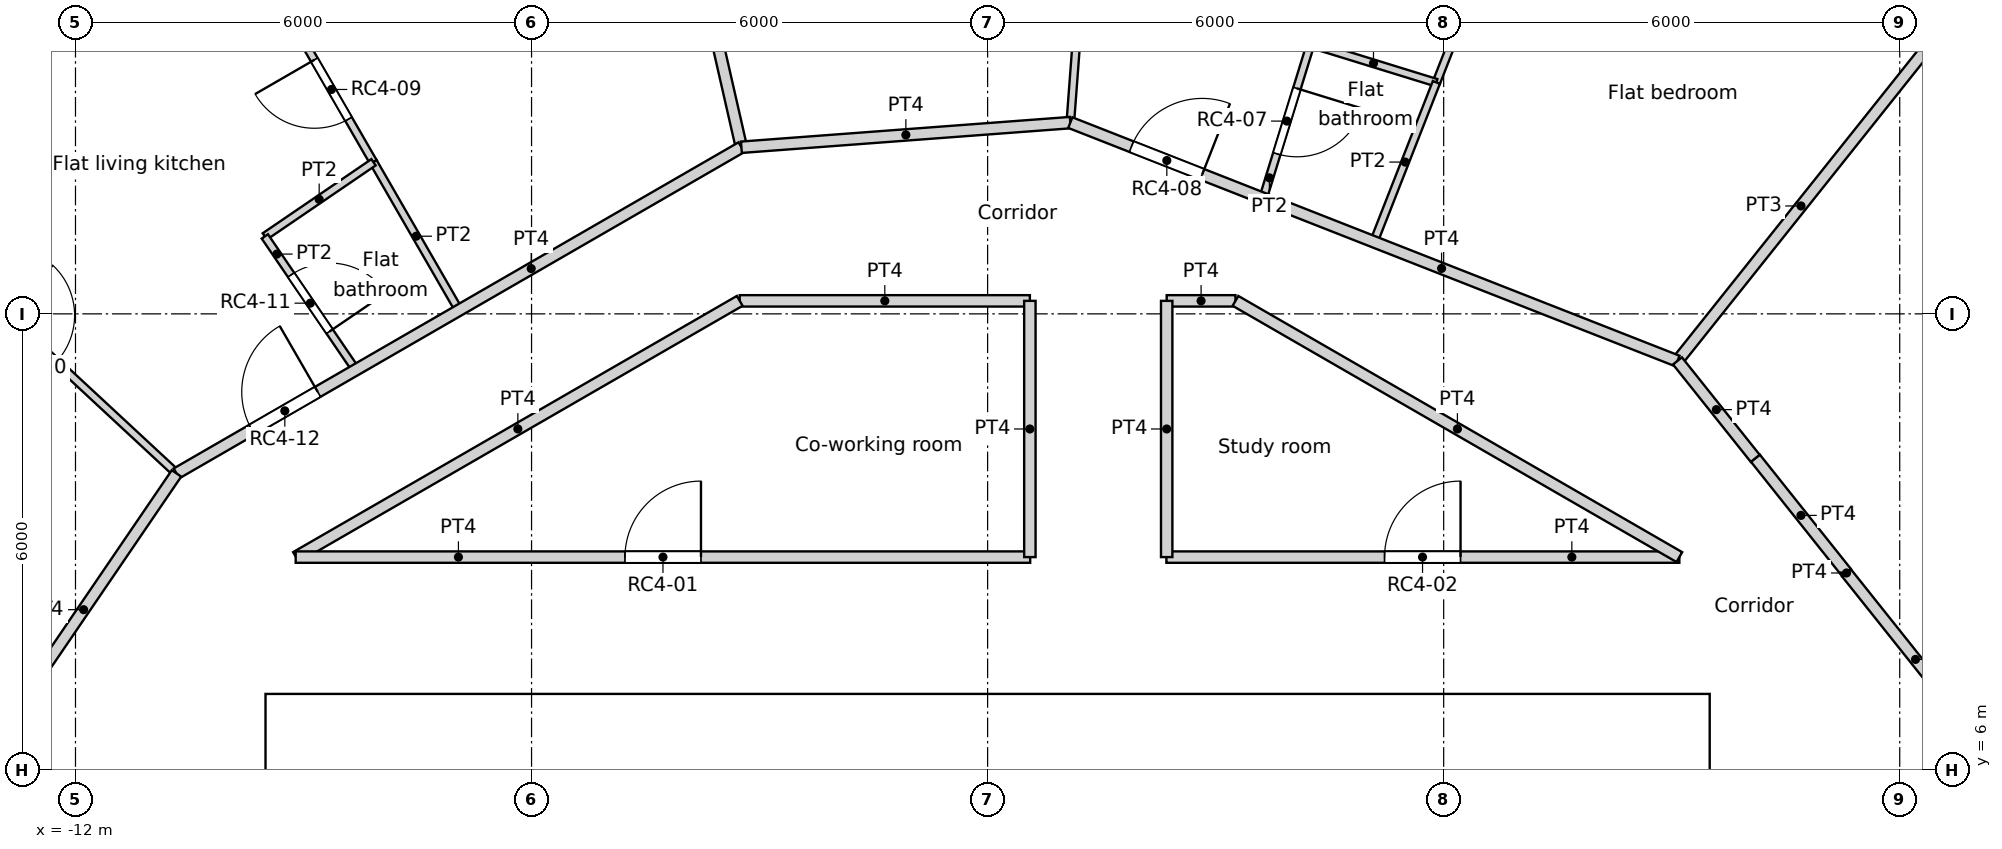
"""IFC4 building model, lengths in metres.
Left out: names, types, materials, properties, quantities, classifications, styles, units other than length and angle.
Written with IfcOpenShell. Run it as: python <this file> out.ifc"""

import sys

from ifc_helpers import new_model, si_unit, direction, frame, frame_2d, origin, origin_2d, place, context, subcontext, project, spatial, rectangle, circle, extrude, element, fill, save


model = new_model("IFC4")
c1 = context("Model", 3, precision=1e-05, world=origin(), true_north=direction((0.0, 1.0)))
c2 = subcontext(c1, "Body", "Model", "MODEL_VIEW")
j1 = project(units=[si_unit("LENGTHUNIT", "METRE"), si_unit("PLANEANGLEUNIT", "RADIAN")], contexts=[c1])
p1 = place(None, origin())
s1 = spatial("IfcSite", under=j1, at=p1, CompositionType="ELEMENT")
p2 = place(p1, origin())
s2 = spatial("IfcBuilding", under=s1, at=p2, CompositionType="ELEMENT")
p3 = place(p2, frame((0.0, 0.0, 263.4)))
s3 = spatial("IfcBuildingStorey", under=s2, at=p3, CompositionType="ELEMENT", Elevation=263.4)
p4 = place(p3, frame((11.735, 14.716, 0.0), z_axis=(0.0, 0.0, 1.0), x_axis=(1.0, 0.0, 0.0)))
e1 = element("IfcColumn", 1, at=p4, inside=s3, PredefinedType="COLUMN", context=c2, shape_type="SweptSolid", body=[
    extrude(circle(Radius=0.55, at=origin_2d()), origin(), (0.0, 0.0, 1.0), 3.6),
])
p5 = place(p3, frame((-9.5, 6.7, 0.0), z_axis=(0.0, 0.0, 1.0), x_axis=(1.0, 0.0, 0.0)))
e2 = element("IfcWall", 2, at=p5, inside=s3, PredefinedType="SOLIDWALL", context=c2, shape_type="SweptSolid", body=[
    extrude(rectangle(XDim=19.0, YDim=0.6, at=frame_2d((9.5, 0.0))), origin(), (0.0, 0.0, 1.0), 3.6),
])
p6 = place(p5, frame((5.35, 0.0, 0.0)))
e3 = element("IfcOpeningElement", 3, at=p6, cuts=e2, PredefinedType="OPENING", context=c2, shape_type="SweptSolid", body=[
    extrude(rectangle(XDim=1.7, YDim=2.1, at=frame_2d((0.85, 1.05))), frame((0.0, 0.3, 0.0), z_axis=(0.0, -1.0, 0.0), x_axis=(1.0, 0.0, 0.0)), (0.0, 0.0, 1.0), 0.6),
])
p7 = place(p3, frame((-9.2, -6.4, 0.0), z_axis=(0.0, 0.0, 1.0), x_axis=(0.0, 1.0, 0.0)))
e4 = element("IfcWall", 4, at=p7, inside=s3, PredefinedType="SOLIDWALL", context=c2, shape_type="SweptSolid", body=[
    extrude(rectangle(XDim=12.8, YDim=0.6, at=frame_2d((6.4, 0.0))), origin(), (0.0, 0.0, 1.0), 3.6),
])
p8 = place(p3, frame((9.2, -6.4, 0.0), z_axis=(0.0, 0.0, 1.0), x_axis=(0.0, 1.0, 0.0)))
e5 = element("IfcWall", 5, at=p8, inside=s3, PredefinedType="SOLIDWALL", context=c2, shape_type="SweptSolid", body=[
    extrude(rectangle(XDim=12.8, YDim=0.6, at=frame_2d((6.4, 0.0))), origin(), (0.0, 0.0, 1.0), 3.6),
])
p9 = place(p8, frame((6.4, 0.0, 0.0)))
e6 = element("IfcOpeningElement", 6, at=p9, cuts=e5, PredefinedType="OPENING", context=c2, shape_type="SweptSolid", body=[
    extrude(rectangle(XDim=1.8, YDim=2.1, at=frame_2d((0.9, 1.05))), frame((0.0, 0.3, 0.0), z_axis=(0.0, -1.0, 0.0), x_axis=(1.0, 0.0, 0.0)), (0.0, 0.0, 1.0), 0.6),
])
for number, where, z_axis, x_axis in (
    (7, (-2.25, 3.25, 0.0), (0.0, 0.0, 1.0), (0.0, 1.0, 0.0)),
    (8, (0.55, 3.25, 0.0), (0.0, 0.0, 1.0), (0.0, 1.0, 0.0)),
    (9, (3.35, 3.25, 0.0), (0.0, 0.0, 1.0), (0.0, 1.0, 0.0)),
    (10, (6.15, 3.25, 0.0), (0.0, 0.0, 1.0), (0.0, 1.0, 0.0)),
):
    element("IfcWall", number, at=place(p3, frame(where, z_axis=z_axis, x_axis=x_axis)), inside=s3, PredefinedType="SOLIDWALL", context=c2, shape_type="SweptSolid", body=[
        extrude(rectangle(XDim=3.15, YDim=0.3, at=frame_2d((1.575, 0.0))), origin(), (0.0, 0.0, 1.0), 3.25),
    ])
p10 = place(p3, frame((-9.103, 8.8, 0.0), z_axis=(0.0, 0.0, 1.0), x_axis=(1.0, 0.0, 0.0)))
e11 = element("IfcWall", 11, at=p10, inside=s3, PredefinedType="PARTITIONING", context=c2, shape_type="SweptSolid", body=[
    extrude(rectangle(XDim=9.663, YDim=0.15, at=frame_2d((4.832, 0.0))), origin(), (0.0, 0.0, 1.0), 3.25),
])
p11 = place(p10, frame((4.332, 0.0, 0.0)))
e12 = element("IfcOpeningElement", 12, at=p11, cuts=e11, PredefinedType="OPENING", context=c2, shape_type="SweptSolid", body=[
    extrude(rectangle(XDim=1.0, YDim=2.04, at=frame_2d((0.5, 1.02))), frame((0.0, 0.075, 0.0), z_axis=(0.0, -1.0, 0.0), x_axis=(1.0, 0.0, 0.0)), (0.0, 0.0, 1.0), 0.15),
])
p12 = place(p3, frame((2.352, 8.8, 0.0), z_axis=(0.0, 0.0, 1.0), x_axis=(1.0, 0.0, 0.0)))
e13 = element("IfcWall", 13, at=p12, inside=s3, PredefinedType="PARTITIONING", context=c2, shape_type="SweptSolid", body=[
    extrude(rectangle(XDim=6.749, YDim=0.15, at=frame_2d((3.374, 0.0))), origin(), (0.0, 0.0, 1.0), 3.25),
])
p13 = place(p12, frame((2.87, 0.0, 0.0)))
e14 = element("IfcOpeningElement", 14, at=p13, cuts=e13, PredefinedType="OPENING", context=c2, shape_type="SweptSolid", body=[
    extrude(rectangle(XDim=1.0, YDim=2.04, at=frame_2d((0.5, 1.02))), frame((0.0, 0.075, 0.0), z_axis=(0.0, -1.0, 0.0), x_axis=(1.0, 0.0, 0.0)), (0.0, 0.0, 1.0), 0.15),
])
p14 = place(p3, frame((10.101, 10.101, 0.0), z_axis=(0.0, 0.0, 1.0), x_axis=(0.623130947784, -0.782117524362, 0.0)))
e15 = element("IfcWall", 15, at=p14, inside=s3, PredefinedType="PARTITIONING", context=c2, shape_type="SweptSolid", body=[
    extrude(rectangle(XDim=1.924, YDim=0.15, at=frame_2d((0.962, 0.0))), origin(), (0.0, 0.0, 1.0), 3.25),
])
p15 = place(p3, frame((11.3, 8.586, 0.0), z_axis=(0.0, 0.0, 1.0), x_axis=(0.0, 1.0, 0.0)))
e16 = element("IfcWall", 16, at=p15, inside=s3, PredefinedType="PARTITIONING", context=c2, shape_type="SweptSolid", body=[
    extrude(rectangle(XDim=0.01, YDim=0.15, at=frame_2d((0.005, 0.0))), origin(), (0.0, 0.0, 1.0), 3.25),
])
p16 = place(p3, frame((11.3, 8.592, 0.0), z_axis=(0.0, 0.0, 1.0), x_axis=(0.623446514299, -0.781866001185, 0.0)))
e17 = element("IfcWall", 17, at=p16, inside=s3, PredefinedType="PARTITIONING", context=c2, shape_type="SweptSolid", body=[
    extrude(rectangle(XDim=2.911, YDim=0.15, at=frame_2d((1.456, 0.0))), origin(), (0.0, 0.0, 1.0), 3.25),
])
p17 = place(p3, frame((0.556, 8.8, 0.0), z_axis=(0.0, 0.0, 1.0), x_axis=(0.0, 1.0, 0.0)))
e18 = element("IfcWall", 18, at=p17, inside=s3, PredefinedType="PARTITIONING", context=c2, shape_type="SweptSolid", body=[
    extrude(rectangle(XDim=3.371, YDim=0.15, at=frame_2d((1.686, 0.0))), origin(), (0.0, 0.0, 1.0), 3.25),
])
p18 = place(p3, frame((-3.261, 12.171, 0.0), z_axis=(0.0, 0.0, 1.0), x_axis=(1.0, 0.0, 0.0)))
e19 = element("IfcWall", 19, at=p18, inside=s3, PredefinedType="PARTITIONING", context=c2, shape_type="SweptSolid", body=[
    extrude(rectangle(XDim=3.817, YDim=0.15, at=frame_2d((1.908, 0.0))), origin(), (0.0, 0.0, 1.0), 3.25),
])
p19 = place(p3, frame((-9.099, 8.801, 0.0), z_axis=(0.0, 0.0, 1.0), x_axis=(0.866068593998, 0.499925184894, 0.0)))
e20 = element("IfcWall", 20, at=p19, inside=s3, PredefinedType="PARTITIONING", context=c2, shape_type="SweptSolid", body=[
    extrude(rectangle(XDim=6.741, YDim=0.15, at=frame_2d((3.371, 0.0))), origin(), (0.0, 0.0, 1.0), 3.25),
])
p20 = place(p3, frame((3.261, 12.171, 0.0), z_axis=(0.0, 0.0, 1.0), x_axis=(0.866066809554, -0.499928276245, 0.0)))
e21 = element("IfcWall", 21, at=p20, inside=s3, PredefinedType="PARTITIONING", context=c2, shape_type="SweptSolid", body=[
    extrude(rectangle(XDim=6.743, YDim=0.15, at=frame_2d((3.371, 0.0))), origin(), (0.0, 0.0, 1.0), 3.25),
])
p21 = place(p3, frame((2.356, 12.171, 0.0), z_axis=(0.0, 0.0, 1.0), x_axis=(1.0, 0.0, 0.0)))
e22 = element("IfcWall", 22, at=p21, inside=s3, PredefinedType="PARTITIONING", context=c2, shape_type="SweptSolid", body=[
    extrude(rectangle(XDim=0.905, YDim=0.15, at=frame_2d((0.453, 0.0))), origin(), (0.0, 0.0, 1.0), 3.25),
])
p22 = place(p3, frame((2.356, 8.8, 0.0), z_axis=(0.0, 0.0, 1.0), x_axis=(0.0, 1.0, 0.0)))
e23 = element("IfcWall", 23, at=p22, inside=s3, PredefinedType="PARTITIONING", context=c2, shape_type="SweptSolid", body=[
    extrude(rectangle(XDim=3.371, YDim=0.15, at=frame_2d((1.686, 0.0))), origin(), (0.0, 0.0, 1.0), 3.25),
])
p23 = place(p3, frame((9.076, 11.381, 0.0), z_axis=(0.0, 0.0, 1.0), x_axis=(0.623805208652, -0.781579849829, 0.0)))
e24 = element("IfcWall", 24, at=p23, inside=s3, PredefinedType="PARTITIONING", context=c2, shape_type="SweptSolid", body=[
    extrude(rectangle(XDim=1.64, YDim=0.15, at=frame_2d((0.82, 0.0))), origin(), (0.0, 0.0, 1.0), 3.25),
])
p24 = place(p3, frame((1.088, 14.516, 0.0), z_axis=(0.0, 0.0, 1.0), x_axis=(0.930800934608, -0.365526497168, 0.0)))
e25 = element("IfcWall", 25, at=p24, inside=s3, PredefinedType="PARTITIONING", context=c2, shape_type="SweptSolid", body=[
    extrude(rectangle(XDim=8.581, YDim=0.15, at=frame_2d((4.291, 0.0))), origin(), (0.0, 0.0, 1.0), 3.25),
])
p25 = place(p24, frame((0.864, 0.0, 0.0)))
e26 = element("IfcOpeningElement", 26, at=p25, cuts=e25, PredefinedType="OPENING", context=c2, shape_type="SweptSolid", body=[
    extrude(rectangle(XDim=1.0, YDim=2.1, at=frame_2d((0.5, 1.05))), frame((0.0, 0.075, 0.0), z_axis=(0.0, -1.0, 0.0), x_axis=(1.0, 0.0, 0.0)), (0.0, 0.0, 1.0), 0.15),
])
p26 = place(p3, frame((-3.239, 14.192, 0.0), z_axis=(0.0, 0.0, 1.0), x_axis=(0.997204448067, 0.074721407608, 0.0)))
e27 = element("IfcWall", 27, at=p26, inside=s3, PredefinedType="PARTITIONING", context=c2, shape_type="SweptSolid", body=[
    extrude(rectangle(XDim=4.339, YDim=0.15, at=frame_2d((2.169, 0.0))), origin(), (0.0, 0.0, 1.0), 3.25),
])
p27 = place(p3, frame((-10.671, 9.901, 0.0), z_axis=(0.0, 0.0, 1.0), x_axis=(0.866021669971, 0.500006467099, 0.0)))
e28 = element("IfcWall", 28, at=p27, inside=s3, PredefinedType="PARTITIONING", context=c2, shape_type="SweptSolid", body=[
    extrude(rectangle(XDim=8.582, YDim=0.15, at=frame_2d((4.291, 0.0))), origin(), (0.0, 0.0, 1.0), 3.25),
])
p28 = place(p27, frame((1.146, 0.0, 0.0)))
e29 = element("IfcOpeningElement", 29, at=p28, cuts=e28, PredefinedType="OPENING", context=c2, shape_type="SweptSolid", body=[
    extrude(rectangle(XDim=1.0, YDim=2.1, at=frame_2d((0.5, 1.05))), frame((0.0, 0.075, 0.0), z_axis=(0.0, -1.0, 0.0), x_axis=(1.0, 0.0, 0.0)), (0.0, 0.0, 1.0), 0.15),
])
p29 = place(p3, frame((-13.115, 6.316, 0.0), z_axis=(0.0, 0.0, 1.0), x_axis=(0.563305396331, 0.826248770325, 0.0)))
e30 = element("IfcWall", 30, at=p29, inside=s3, PredefinedType="PARTITIONING", context=c2, shape_type="SweptSolid", body=[
    extrude(rectangle(XDim=4.339, YDim=0.15, at=frame_2d((2.169, 0.0))), origin(), (0.0, 0.0, 1.0), 3.25),
])
p30 = place(p3, frame((9.076, 11.381, 0.0), z_axis=(0.0, 0.0, 1.0), x_axis=(0.623460949534, 0.781854490558, 0.0)))
e31 = element("IfcWall", 31, at=p30, inside=s3, PredefinedType="PARTITIONING", context=c2, shape_type="SweptSolid", body=[
    extrude(rectangle(XDim=5.214, YDim=0.15, at=frame_2d((2.607, 0.0))), origin(), (0.0, 0.0, 1.0), 3.25),
])
p31 = place(p3, frame((5.903, 15.041, 0.0), z_axis=(0.0, 0.0, 1.0), x_axis=(0.36523219083, 0.930916455318, 0.0)))
e32 = element("IfcWall", 32, at=p31, inside=s3, PredefinedType="PARTITIONING", context=c2, shape_type="SweptSolid", body=[
    extrude(rectangle(XDim=3.614, YDim=0.1, at=frame_2d((1.807, 0.0))), origin(), (0.0, 0.0, 1.0), 3.25),
])
p32 = place(p31, frame((0.657, 0.0, 0.0)))
e33 = element("IfcOpeningElement", 33, at=p32, cuts=e32, PredefinedType="OPENING", context=c2, shape_type="SweptSolid", body=[
    extrude(rectangle(XDim=0.9, YDim=2.1, at=frame_2d((0.45, 1.05))), frame((0.0, 0.05, 0.0), z_axis=(0.0, -1.0, 0.0), x_axis=(1.0, 0.0, 0.0)), (0.0, 0.0, 1.0), 0.1),
])
p33 = place(p3, frame((1.088, 14.516, 0.0), z_axis=(0.0, 0.0, 1.0), x_axis=(0.074816718541, 0.997197301755, 0.0)))
e34 = element("IfcWall", 34, at=p33, inside=s3, PredefinedType="PARTITIONING", context=c2, shape_type="SweptSolid", body=[
    extrude(rectangle(XDim=5.215, YDim=0.1, at=frame_2d((2.607, 0.0))), origin(), (0.0, 0.0, 1.0), 3.25),
])
p34 = place(p33, frame((2.157, 0.0, 0.0)))
e35 = element("IfcOpeningElement", 35, at=p34, cuts=e34, PredefinedType="OPENING", context=c2, shape_type="SweptSolid", body=[
    extrude(rectangle(XDim=0.9, YDim=2.1, at=frame_2d((0.45, 1.05))), frame((0.0, 0.05, 0.0), z_axis=(0.0, -1.0, 0.0), x_axis=(1.0, 0.0, 0.0)), (0.0, 0.0, 1.0), 0.1),
])
p35 = place(p3, frame((4.25, 15.551, 0.0), z_axis=(0.0, 0.0, 1.0), x_axis=(0.955555986234, -0.294809696536, 0.0)))
e36 = element("IfcWall", 36, at=p35, inside=s3, PredefinedType="PARTITIONING", context=c2, shape_type="SweptSolid", body=[
    extrude(rectangle(XDim=1.73, YDim=0.1, at=frame_2d((0.865, 0.0))), origin(), (0.0, 0.0, 1.0), 3.25),
])
p36 = place(p3, frame((3.624, 13.521, 0.0), z_axis=(0.0, 0.0, 1.0), x_axis=(0.294667251911, 0.955599921856, 0.0)))
e37 = element("IfcWall", 37, at=p36, inside=s3, PredefinedType="PARTITIONING", context=c2, shape_type="SweptSolid", body=[
    extrude(rectangle(XDim=2.124, YDim=0.1, at=frame_2d((1.062, 0.0))), origin(), (0.0, 0.0, 1.0), 3.25),
])
p37 = place(p36, frame((0.612, 0.0, 0.0)))
e38 = element("IfcOpeningElement", 38, at=p37, cuts=e37, PredefinedType="OPENING", context=c2, shape_type="SweptSolid", body=[
    extrude(rectangle(XDim=0.9, YDim=2.0, at=frame_2d((0.45, 1.0))), frame((0.0, 0.05, 0.0), z_axis=(0.0, -1.0, 0.0), x_axis=(1.0, 0.0, 0.0)), (0.0, 0.0, 1.0), 0.1),
])
p38 = place(p3, frame((5.082, 12.949, 0.0), z_axis=(0.0, 0.0, 1.0), x_axis=(0.365118857447, 0.930960912142, 0.0)))
e39 = element("IfcWall", 39, at=p38, inside=s3, PredefinedType="PARTITIONING", context=c2, shape_type="SweptSolid", body=[
    extrude(rectangle(XDim=2.251, YDim=0.1, at=frame_2d((1.126, 0.0))), origin(), (0.0, 0.0, 1.0), 3.25),
])
p39 = place(p3, frame((-4.4, 19.276, 0.0), z_axis=(0.0, 0.0, 1.0), x_axis=(0.222612505682, -0.974907007008, 0.0)))
e40 = element("IfcWall", 40, at=p39, inside=s3, PredefinedType="PARTITIONING", context=c2, shape_type="SweptSolid", body=[
    extrude(rectangle(XDim=5.215, YDim=0.15, at=frame_2d((2.607, 0.0))), origin(), (0.0, 0.0, 1.0), 3.25),
])
p40 = place(p3, frame((-9.886, 17.122, 0.0), z_axis=(0.0, 0.0, 1.0), x_axis=(0.500172881213, -0.865925567759, 0.0)))
e41 = element("IfcWall", 41, at=p40, inside=s3, PredefinedType="PARTITIONING", context=c2, shape_type="SweptSolid", body=[
    extrude(rectangle(XDim=3.613, YDim=0.1, at=frame_2d((1.806, 0.0))), origin(), (0.0, 0.0, 1.0), 3.25),
])
p41 = place(p40, frame((2.056, 0.0, 0.0)))
e42 = element("IfcOpeningElement", 42, at=p41, cuts=e41, PredefinedType="OPENING", context=c2, shape_type="SweptSolid", body=[
    extrude(rectangle(XDim=0.9, YDim=2.1, at=frame_2d((0.45, 1.05))), frame((0.0, 0.05, 0.0), z_axis=(0.0, -1.0, 0.0), x_axis=(1.0, 0.0, 0.0)), (0.0, 0.0, 1.0), 0.1),
])
p42 = place(p3, frame((-14.493, 13.448, 0.0), z_axis=(0.0, 0.0, 1.0), x_axis=(0.732975231717, -0.680255326836, 0.0)))
e43 = element("IfcWall", 43, at=p42, inside=s3, PredefinedType="PARTITIONING", context=c2, shape_type="SweptSolid", body=[
    extrude(rectangle(XDim=5.214, YDim=0.1, at=frame_2d((2.607, 0.0))), origin(), (0.0, 0.0, 1.0), 3.25),
])
p43 = place(p42, frame((2.157, 0.0, 0.0)))
e44 = element("IfcOpeningElement", 44, at=p43, cuts=e43, PredefinedType="OPENING", context=c2, shape_type="SweptSolid", body=[
    extrude(rectangle(XDim=0.9, YDim=2.1, at=frame_2d((0.45, 1.05))), frame((0.0, 0.05, 0.0), z_axis=(0.0, -1.0, 0.0), x_axis=(1.0, 0.0, 0.0)), (0.0, 0.0, 1.0), 0.1),
])
p44 = place(p3, frame((-9.509, 13.019, 0.0), z_axis=(0.0, 0.0, 1.0), x_axis=(0.826254203104, 0.563297427522, 0.0)))
e45 = element("IfcWall", 45, at=p44, inside=s3, PredefinedType="PARTITIONING", context=c2, shape_type="SweptSolid", body=[
    extrude(rectangle(XDim=1.731, YDim=0.1, at=frame_2d((0.865, 0.0))), origin(), (0.0, 0.0, 1.0), 3.25),
])
p45 = place(p3, frame((-9.509, 13.019, 0.0), z_axis=(0.0, 0.0, 1.0), x_axis=(0.563233448692, -0.826297816937, 0.0)))
e46 = element("IfcWall", 46, at=p45, inside=s3, PredefinedType="PARTITIONING", context=c2, shape_type="SweptSolid", body=[
    extrude(rectangle(XDim=2.125, YDim=0.1, at=frame_2d((1.062, 0.0))), origin(), (0.0, 0.0, 1.0), 3.25),
])
p46 = place(p45, frame((0.613, 0.0, 0.0)))
e47 = element("IfcOpeningElement", 47, at=p46, cuts=e46, PredefinedType="OPENING", context=c2, shape_type="SweptSolid", body=[
    extrude(rectangle(XDim=0.9, YDim=2.0, at=frame_2d((0.45, 1.0))), frame((0.0, 0.05, 0.0), z_axis=(0.0, -1.0, 0.0), x_axis=(1.0, 0.0, 0.0)), (0.0, 0.0, 1.0), 0.1),
])
p47 = place(p3, frame((-8.081, 13.997, 0.0), z_axis=(0.0, 0.0, 1.0), x_axis=(0.49982252503, -0.866127844762, 0.0)))
e48 = element("IfcWall", 48, at=p47, inside=s3, PredefinedType="PARTITIONING", context=c2, shape_type="SweptSolid", body=[
    extrude(rectangle(XDim=2.253, YDim=0.1, at=frame_2d((1.126, 0.0))), origin(), (0.0, 0.0, 1.0), 3.25),
])
p48 = place(p6, origin())
e49 = element("IfcDoor", 49, at=p48, inside=s3, OperationType="DOUBLE_DOOR_SINGLE_SWING", PredefinedType="DOOR", context=c2, shape_type="SweptSolid", body=[
    extrude(rectangle(XDim=1.7, YDim=2.1, at=frame_2d((0.85, 1.05))), frame((0.0, 0.025, 0.0), z_axis=(0.0, -1.0, 0.0), x_axis=(1.0, 0.0, 0.0)), (0.0, 0.0, 1.0), 0.05),
])
fill(e3, e49)
p49 = place(p11, origin())
e50 = element("IfcDoor", 50, at=p49, inside=s3, OperationType="SINGLE_SWING_RIGHT", PredefinedType="DOOR", context=c2, shape_type="SweptSolid", body=[
    extrude(rectangle(XDim=1.0, YDim=2.04, at=frame_2d((0.5, 1.02))), frame((0.0, 0.025, 0.0), z_axis=(0.0, -1.0, 0.0), x_axis=(1.0, 0.0, 0.0)), (0.0, 0.0, 1.0), 0.05),
])
fill(e12, e50)
p50 = place(p13, origin())
e51 = element("IfcDoor", 51, at=p50, inside=s3, OperationType="SINGLE_SWING_RIGHT", PredefinedType="DOOR", context=c2, shape_type="SweptSolid", body=[
    extrude(rectangle(XDim=1.0, YDim=2.04, at=frame_2d((0.5, 1.02))), frame((0.0, 0.025, 0.0), z_axis=(0.0, -1.0, 0.0), x_axis=(1.0, 0.0, 0.0)), (0.0, 0.0, 1.0), 0.05),
])
fill(e14, e51)
p51 = place(p37, origin())
e52 = element("IfcDoor", 52, at=p51, inside=s3, OperationType="SINGLE_SWING_LEFT", PredefinedType="DOOR", context=c2, shape_type="SweptSolid", body=[
    extrude(rectangle(XDim=0.9, YDim=2.0, at=frame_2d((0.45, 1.0))), frame((0.0, 0.025, 0.0), z_axis=(0.0, -1.0, 0.0), x_axis=(1.0, 0.0, 0.0)), (0.0, 0.0, 1.0), 0.05),
])
fill(e38, e52)
p52 = place(p25, origin())
e53 = element("IfcDoor", 53, at=p52, inside=s3, OperationType="SINGLE_SWING_RIGHT", PredefinedType="DOOR", context=c2, shape_type="SweptSolid", body=[
    extrude(rectangle(XDim=1.0, YDim=2.1, at=frame_2d((0.5, 1.05))), frame((0.0, 0.025, 0.0), z_axis=(0.0, -1.0, 0.0), x_axis=(1.0, 0.0, 0.0)), (0.0, 0.0, 1.0), 0.05),
])
fill(e26, e53)
p53 = place(p41, origin())
e54 = element("IfcDoor", 54, at=p53, inside=s3, OperationType="SINGLE_SWING_RIGHT", PredefinedType="DOOR", context=c2, shape_type="SweptSolid", body=[
    extrude(rectangle(XDim=0.9, YDim=2.1, at=frame_2d((0.45, 1.05))), frame((0.0, 0.025, 0.0), z_axis=(0.0, -1.0, 0.0), x_axis=(1.0, 0.0, 0.0)), (0.0, 0.0, 1.0), 0.05),
])
fill(e42, e54)
p54 = place(p43, origin())
e55 = element("IfcDoor", 55, at=p54, inside=s3, OperationType="SINGLE_SWING_LEFT", PredefinedType="DOOR", context=c2, shape_type="SweptSolid", body=[
    extrude(rectangle(XDim=0.9, YDim=2.1, at=frame_2d((0.45, 1.05))), frame((0.0, 0.025, 0.0), z_axis=(0.0, -1.0, 0.0), x_axis=(1.0, 0.0, 0.0)), (0.0, 0.0, 1.0), 0.05),
])
fill(e44, e55)
p55 = place(p46, origin())
e56 = element("IfcDoor", 56, at=p55, inside=s3, OperationType="SINGLE_SWING_RIGHT", PredefinedType="DOOR", context=c2, shape_type="SweptSolid", body=[
    extrude(rectangle(XDim=0.9, YDim=2.0, at=frame_2d((0.45, 1.0))), frame((0.0, 0.025, 0.0), z_axis=(0.0, -1.0, 0.0), x_axis=(1.0, 0.0, 0.0)), (0.0, 0.0, 1.0), 0.05),
])
fill(e47, e56)
p56 = place(p28, origin())
e57 = element("IfcDoor", 57, at=p56, inside=s3, OperationType="SINGLE_SWING_RIGHT", PredefinedType="DOOR", context=c2, shape_type="SweptSolid", body=[
    extrude(rectangle(XDim=1.0, YDim=2.1, at=frame_2d((0.5, 1.05))), frame((0.0, 0.025, 0.0), z_axis=(0.0, -1.0, 0.0), x_axis=(1.0, 0.0, 0.0)), (0.0, 0.0, 1.0), 0.05),
])
fill(e29, e57)
save(model, sys.argv[1])
